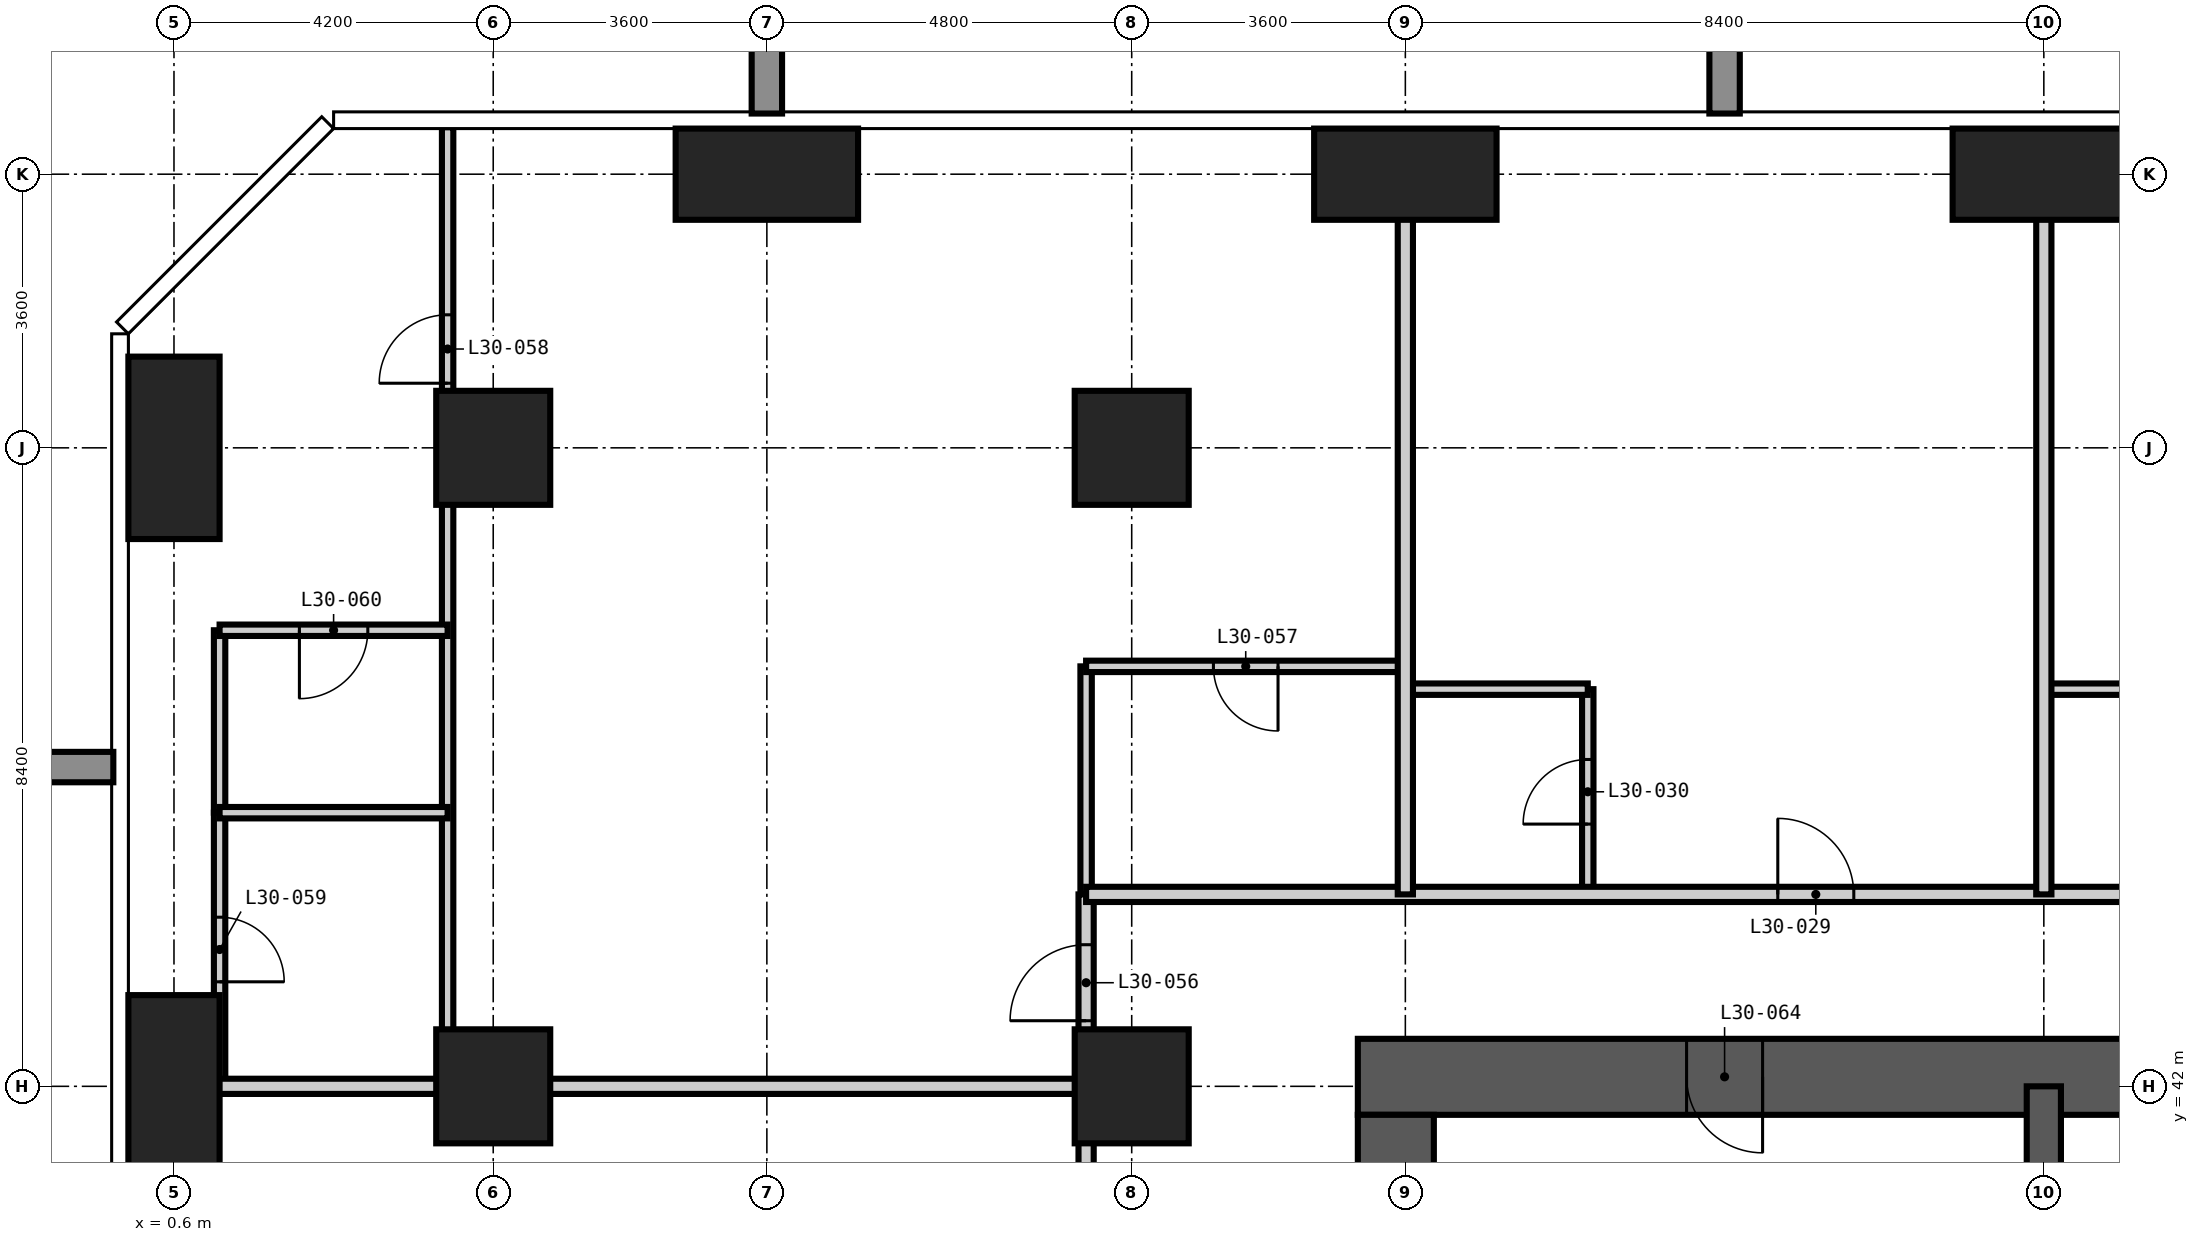
"""IFC4 building model, lengths in metres.
Left out: names, types, materials, properties, quantities, classifications, styles, units other than length and angle.
Written with IfcOpenShell. Run it as: python <this file> out.ifc"""

import sys

from ifc_helpers import new_model, si_unit, direction, frame, frame_2d, origin, origin_2d, place, context, subcontext, project, spatial, rectangle, extrude, element, fill, save


model = new_model("IFC4")
c1 = context("Model", 3, precision=1e-05, world=origin(), true_north=direction((0.0, 1.0)))
c2 = subcontext(c1, "Body", "Model", "MODEL_VIEW")
j1 = project(units=[si_unit("LENGTHUNIT", "METRE"), si_unit("PLANEANGLEUNIT", "RADIAN")], contexts=[c1])
p1 = place(None, origin())
s1 = spatial("IfcSite", under=j1, at=p1, CompositionType="ELEMENT")
p2 = place(p1, origin())
s2 = spatial("IfcBuilding", under=s1, at=p2, CompositionType="ELEMENT")
p3 = place(p2, frame((0.0, 0.0, 118.8)))
s3 = spatial("IfcBuildingStorey", under=s2, at=p3, CompositionType="ELEMENT", Elevation=118.8)
for number, where, z_axis, x_axis in (
    (1, (0.6, 42.0, -0.35), (0.0, 0.0, 1.0), (1.0, 0.0, 0.0)),
    (2, (0.6, 50.4, -0.35), (0.0, 0.0, 1.0), (1.0, 0.0, 0.0)),
):
    element("IfcColumn", number, at=place(p3, frame(where, z_axis=z_axis, x_axis=x_axis)), inside=s3, PredefinedType="COLUMN", context=c2, shape_type="SweptSolid", body=[
        extrude(rectangle(XDim=1.2, YDim=2.4, at=origin_2d()), origin(), (0.0, 0.0, 1.0), 3.6),
    ])
for number, where, z_axis, x_axis in (
    (3, (4.8, 42.0, -0.35), (0.0, 0.0, 1.0), (1.0, 0.0, 0.0)),
    (4, (4.8, 50.4, -0.35), (0.0, 0.0, 1.0), (1.0, 0.0, 0.0)),
):
    element("IfcColumn", number, at=place(p3, frame(where, z_axis=z_axis, x_axis=x_axis)), inside=s3, PredefinedType="COLUMN", context=c2, shape_type="SweptSolid", body=[
        extrude(rectangle(XDim=1.5, YDim=1.5, at=origin_2d()), origin(), (0.0, 0.0, 1.0), 3.6),
    ])
p4 = place(p3, frame((8.4, 54.0, -0.35), z_axis=(0.0, 0.0, 1.0), x_axis=(1.0, 0.0, 0.0)))
e5 = element("IfcColumn", 5, at=p4, inside=s3, PredefinedType="COLUMN", context=c2, shape_type="SweptSolid", body=[
    extrude(rectangle(XDim=2.4, YDim=1.2, at=origin_2d()), origin(), (0.0, 0.0, 1.0), 3.6),
])
for number, where, z_axis, x_axis in (
    (6, (13.2, 42.0, -0.35), (0.0, 0.0, 1.0), (1.0, 0.0, 0.0)),
    (7, (13.2, 50.4, -0.35), (0.0, 0.0, 1.0), (1.0, 0.0, 0.0)),
):
    element("IfcColumn", number, at=place(p3, frame(where, z_axis=z_axis, x_axis=x_axis)), inside=s3, PredefinedType="COLUMN", context=c2, shape_type="SweptSolid", body=[
        extrude(rectangle(XDim=1.5, YDim=1.5, at=origin_2d()), origin(), (0.0, 0.0, 1.0), 3.6),
    ])
for number, where, z_axis, x_axis in (
    (8, (16.8, 54.0, -0.35), (0.0, 0.0, 1.0), (1.0, 0.0, 0.0)),
    (9, (25.2, 54.0, -0.35), (0.0, 0.0, 1.0), (1.0, 0.0, 0.0)),
):
    element("IfcColumn", number, at=place(p3, frame(where, z_axis=z_axis, x_axis=x_axis)), inside=s3, PredefinedType="COLUMN", context=c2, shape_type="SweptSolid", body=[
        extrude(rectangle(XDim=2.4, YDim=1.2, at=origin_2d()), origin(), (0.0, 0.0, 1.0), 3.6),
    ])
p5 = place(p3, frame((42.625, 42.125, -0.35), z_axis=(0.0, 0.0, 1.0), x_axis=(-1.0, 0.0, 0.0)))
e10 = element("IfcWall", 10, at=p5, inside=s3, PredefinedType="SHEAR", context=c2, shape_type="SweptSolid", body=[
    extrude(rectangle(XDim=26.45, YDim=1.0, at=frame_2d((13.225, 0.0))), origin(), (0.0, 0.0, 1.0), 3.6),
])
p6 = place(p5, frame((21.125, 0.0, 0.35)))
e11 = element("IfcOpeningElement", 11, at=p6, cuts=e10, PredefinedType="OPENING", context=c2, shape_type="SweptSolid", body=[
    extrude(rectangle(XDim=1.0, YDim=2.1, at=frame_2d((0.5, 1.05))), frame((0.0, 0.51, 0.0), z_axis=(0.0, -1.0, 0.0), x_axis=(1.0, 0.0, 0.0)), (0.0, 0.0, 1.0), 1.02),
])
p7 = place(p5, frame((10.525, 0.0, 0.35)))
e12 = element("IfcOpeningElement", 12, at=p7, cuts=e10, PredefinedType="OPENING", context=c2, shape_type="SweptSolid", body=[
    extrude(rectangle(XDim=1.2, YDim=2.2, at=frame_2d((0.6, 1.1))), frame((0.0, 0.51, 0.0), z_axis=(0.0, -1.0, 0.0), x_axis=(1.0, 0.0, 0.0)), (0.0, 0.0, 1.0), 1.02),
])
p8 = place(p3, frame((16.675, 41.625, -0.35), z_axis=(0.0, 0.0, 1.0), x_axis=(0.0, -1.0, 0.0)))
e13 = element("IfcWall", 13, at=p8, inside=s3, PredefinedType="SHEAR", context=c2, shape_type="SweptSolid", body=[
    extrude(rectangle(XDim=24.45, YDim=1.0, at=frame_2d((12.225, 0.0))), origin(), (0.0, 0.0, 1.0), 3.6),
])
p9 = place(p8, frame((11.325, 0.0, 0.35)))
e14 = element("IfcOpeningElement", 14, at=p9, cuts=e13, PredefinedType="OPENING", context=c2, shape_type="SweptSolid", body=[
    extrude(rectangle(XDim=1.8, YDim=2.2, at=frame_2d((0.9, 1.1))), frame((0.0, 0.51, 0.0), z_axis=(0.0, -1.0, 0.0), x_axis=(1.0, 0.0, 0.0)), (0.0, 0.0, 1.0), 1.02),
])
p10 = place(p8, frame((20.125, 0.0, 0.35)))
e15 = element("IfcOpeningElement", 15, at=p10, cuts=e13, PredefinedType="OPENING", context=c2, shape_type="SweptSolid", body=[
    extrude(rectangle(XDim=1.0, YDim=2.1, at=frame_2d((0.5, 1.05))), frame((0.0, 0.51, 0.0), z_axis=(0.0, -1.0, 0.0), x_axis=(1.0, 0.0, 0.0)), (0.0, 0.0, 1.0), 1.02),
])
p11 = place(p8, frame((5.425, 0.0, 0.35)))
e16 = element("IfcOpeningElement", 16, at=p11, cuts=e13, PredefinedType="OPENING", context=c2, shape_type="SweptSolid", body=[
    extrude(rectangle(XDim=1.0, YDim=2.1, at=frame_2d((0.5, 1.05))), frame((0.0, 0.51, 0.0), z_axis=(0.0, -1.0, 0.0), x_axis=(1.0, 0.0, 0.0)), (0.0, 0.0, 1.0), 1.02),
])
p12 = place(p3, frame((25.2, 16.8, -0.35), z_axis=(0.0, 0.0, 1.0), x_axis=(0.0, 1.0, 0.0)))
e17 = element("IfcWall", 17, at=p12, inside=s3, PredefinedType="SHEAR", context=c2, shape_type="SweptSolid", body=[
    extrude(rectangle(XDim=25.2, YDim=0.45, at=frame_2d((12.6, 0.0))), origin(), (0.0, 0.0, 1.0), 3.6),
])
p13 = place(p12, frame((12.1, 0.0, 0.35)))
e18 = element("IfcOpeningElement", 18, at=p13, cuts=e17, PredefinedType="OPENING", context=c2, shape_type="SweptSolid", body=[
    extrude(rectangle(XDim=1.0, YDim=2.1, at=frame_2d((0.5, 1.05))), frame((0.0, 0.235, 0.0), z_axis=(0.0, -1.0, 0.0), x_axis=(1.0, 0.0, 0.0)), (0.0, 0.0, 1.0), 0.47),
])
p14 = place(p3, frame((1.2, 42.0, 0.0), z_axis=(0.0, 0.0, 1.0), x_axis=(0.0, 1.0, 0.0)))
e19 = element("IfcWall", 19, at=p14, inside=s3, PredefinedType="PARTITIONING", context=c2, shape_type="SweptSolid", body=[
    extrude(rectangle(XDim=3.6, YDim=0.15, at=frame_2d((1.8, 0.0))), origin(), (0.0, 0.0, 1.0), 3.25),
])
p15 = place(p14, frame((1.375, 0.0, 0.0)))
e20 = element("IfcOpeningElement", 20, at=p15, cuts=e19, PredefinedType="OPENING", context=c2, shape_type="SweptSolid", body=[
    extrude(rectangle(XDim=0.85, YDim=2.1, at=frame_2d((0.425, 1.05))), frame((0.0, 0.085, 0.0), z_axis=(0.0, -1.0, 0.0), x_axis=(1.0, 0.0, 0.0)), (0.0, 0.0, 1.0), 0.17),
])
p16 = place(p3, frame((12.6, 44.525, 0.0), z_axis=(0.0, 0.0, 1.0), x_axis=(0.0, 1.0, 0.0)))
e21 = element("IfcWall", 21, at=p16, inside=s3, PredefinedType="PARTITIONING", context=c2, shape_type="SweptSolid", body=[
    extrude(rectangle(XDim=3.0, YDim=0.15, at=frame_2d((1.5, 0.0))), origin(), (0.0, 0.0, 1.0), 3.25),
])
p17 = place(p3, frame((19.2, 44.525, 0.0), z_axis=(0.0, 0.0, 1.0), x_axis=(0.0, 1.0, 0.0)))
e22 = element("IfcWall", 22, at=p17, inside=s3, PredefinedType="PARTITIONING", context=c2, shape_type="SweptSolid", body=[
    extrude(rectangle(XDim=2.7, YDim=0.15, at=frame_2d((1.35, 0.0))), origin(), (0.0, 0.0, 1.0), 3.25),
])
p18 = place(p17, frame((0.925, 0.0, 0.0)))
e23 = element("IfcOpeningElement", 23, at=p18, cuts=e22, PredefinedType="OPENING", context=c2, shape_type="SweptSolid", body=[
    extrude(rectangle(XDim=0.85, YDim=2.1, at=frame_2d((0.425, 1.05))), frame((0.0, 0.085, 0.0), z_axis=(0.0, -1.0, 0.0), x_axis=(1.0, 0.0, 0.0)), (0.0, 0.0, 1.0), 0.17),
])
p19 = place(p3, frame((16.8, 47.225, 0.0), z_axis=(0.0, 0.0, 1.0), x_axis=(1.0, 0.0, 0.0)))
e24 = element("IfcWall", 24, at=p19, inside=s3, PredefinedType="PARTITIONING", context=c2, shape_type="SweptSolid", body=[
    extrude(rectangle(XDim=2.4, YDim=0.15, at=frame_2d((1.2, 0.0))), origin(), (0.0, 0.0, 1.0), 3.25),
])
p20 = place(p3, frame((25.2, 47.225, 0.0), z_axis=(0.0, 0.0, 1.0), x_axis=(1.0, 0.0, 0.0)))
e25 = element("IfcWall", 25, at=p20, inside=s3, PredefinedType="PARTITIONING", context=c2, shape_type="SweptSolid", body=[
    extrude(rectangle(XDim=2.4, YDim=0.15, at=frame_2d((1.2, 0.0))), origin(), (0.0, 0.0, 1.0), 3.25),
])
p21 = place(p3, frame((12.6, 47.525, 0.0), z_axis=(0.0, 0.0, 1.0), x_axis=(1.0, 0.0, 0.0)))
e26 = element("IfcWall", 26, at=p21, inside=s3, PredefinedType="PARTITIONING", context=c2, shape_type="SweptSolid", body=[
    extrude(rectangle(XDim=4.2, YDim=0.15, at=frame_2d((2.1, 0.0))), origin(), (0.0, 0.0, 1.0), 3.25),
])
p22 = place(p21, frame((1.675, 0.0, 0.0)))
e27 = element("IfcOpeningElement", 27, at=p22, cuts=e26, PredefinedType="OPENING", context=c2, shape_type="SweptSolid", body=[
    extrude(rectangle(XDim=0.85, YDim=2.1, at=frame_2d((0.425, 1.05))), frame((0.0, 0.085, 0.0), z_axis=(0.0, -1.0, 0.0), x_axis=(1.0, 0.0, 0.0)), (0.0, 0.0, 1.0), 0.17),
])
p23 = place(p3, frame((12.6, 13.075, 0.0), z_axis=(0.0, 0.0, 1.0), x_axis=(0.0, 1.0, 0.0)))
e28 = element("IfcWall", 28, at=p23, inside=s3, PredefinedType="PARTITIONING", context=c2, shape_type="SweptSolid", body=[
    extrude(rectangle(XDim=31.45, YDim=0.2, at=frame_2d((15.725, 0.0))), origin(), (0.0, 0.0, 1.0), 3.25),
])
p24 = place(p23, frame((8.625, 0.0, 0.0)))
e29 = element("IfcOpeningElement", 29, at=p24, cuts=e28, PredefinedType="OPENING", context=c2, shape_type="SweptSolid", body=[
    extrude(rectangle(XDim=1.0, YDim=2.2, at=frame_2d((0.5, 1.1))), frame((0.0, 0.11, 0.0), z_axis=(0.0, -1.0, 0.0), x_axis=(1.0, 0.0, 0.0)), (0.0, 0.0, 1.0), 0.22),
])
p25 = place(p23, frame((17.025, 0.0, 0.0)))
e30 = element("IfcOpeningElement", 30, at=p25, cuts=e28, PredefinedType="OPENING", context=c2, shape_type="SweptSolid", body=[
    extrude(rectangle(XDim=1.0, YDim=2.2, at=frame_2d((0.5, 1.1))), frame((0.0, 0.11, 0.0), z_axis=(0.0, -1.0, 0.0), x_axis=(1.0, 0.0, 0.0)), (0.0, 0.0, 1.0), 0.22),
])
p26 = place(p23, frame((25.425, 0.0, 0.0)))
e31 = element("IfcOpeningElement", 31, at=p26, cuts=e28, PredefinedType="OPENING", context=c2, shape_type="SweptSolid", body=[
    extrude(rectangle(XDim=1.0, YDim=2.2, at=frame_2d((0.5, 1.1))), frame((0.0, 0.11, 0.0), z_axis=(0.0, -1.0, 0.0), x_axis=(1.0, 0.0, 0.0)), (0.0, 0.0, 1.0), 0.22),
])
p27 = place(p23, frame((1.363, 0.0, 0.0)))
e32 = element("IfcOpeningElement", 32, at=p27, cuts=e28, PredefinedType="OPENING", context=c2, shape_type="SweptSolid", body=[
    extrude(rectangle(XDim=1.0, YDim=2.2, at=frame_2d((0.5, 1.1))), frame((0.0, 0.11, 0.0), z_axis=(0.0, -1.0, 0.0), x_axis=(1.0, 0.0, 0.0)), (0.0, 0.0, 1.0), 0.22),
])
p28 = place(p23, frame((29.788, 0.0, 0.0)))
e33 = element("IfcOpeningElement", 33, at=p28, cuts=e28, PredefinedType="OPENING", context=c2, shape_type="SweptSolid", body=[
    extrude(rectangle(XDim=1.0, YDim=2.2, at=frame_2d((0.5, 1.1))), frame((0.0, 0.11, 0.0), z_axis=(0.0, -1.0, 0.0), x_axis=(1.0, 0.0, 0.0)), (0.0, 0.0, 1.0), 0.22),
])
p29 = place(p3, frame((12.6, 44.525, 0.0), z_axis=(0.0, 0.0, 1.0), x_axis=(1.0, 0.0, 0.0)))
e34 = element("IfcWall", 34, at=p29, inside=s3, PredefinedType="PARTITIONING", context=c2, shape_type="SweptSolid", body=[
    extrude(rectangle(XDim=32.525, YDim=0.2, at=frame_2d((16.262, 0.0))), origin(), (0.0, 0.0, 1.0), 3.25),
])
p30 = place(p29, frame((9.1, 0.0, 0.0)))
e35 = element("IfcOpeningElement", 35, at=p30, cuts=e34, PredefinedType="OPENING", context=c2, shape_type="SweptSolid", body=[
    extrude(rectangle(XDim=1.0, YDim=2.2, at=frame_2d((0.5, 1.1))), frame((0.0, 0.11, 0.0), z_axis=(0.0, -1.0, 0.0), x_axis=(1.0, 0.0, 0.0)), (0.0, 0.0, 1.0), 0.22),
])
p31 = place(p29, frame((17.5, 0.0, 0.0)))
e36 = element("IfcOpeningElement", 36, at=p31, cuts=e34, PredefinedType="OPENING", context=c2, shape_type="SweptSolid", body=[
    extrude(rectangle(XDim=1.0, YDim=2.2, at=frame_2d((0.5, 1.1))), frame((0.0, 0.11, 0.0), z_axis=(0.0, -1.0, 0.0), x_axis=(1.0, 0.0, 0.0)), (0.0, 0.0, 1.0), 0.22),
])
p32 = place(p29, frame((25.9, 0.0, 0.0)))
e37 = element("IfcOpeningElement", 37, at=p32, cuts=e34, PredefinedType="OPENING", context=c2, shape_type="SweptSolid", body=[
    extrude(rectangle(XDim=1.0, YDim=2.2, at=frame_2d((0.5, 1.1))), frame((0.0, 0.11, 0.0), z_axis=(0.0, -1.0, 0.0), x_axis=(1.0, 0.0, 0.0)), (0.0, 0.0, 1.0), 0.22),
])
for number, where, z_axis, x_axis in (
    (38, (16.8, 44.525, 0.0), (0.0, 0.0, 1.0), (0.0, 1.0, 0.0)),
    (39, (25.2, 44.525, 0.0), (0.0, 0.0, 1.0), (0.0, 1.0, 0.0)),
):
    element("IfcWall", number, at=place(p3, frame(where, z_axis=z_axis, x_axis=x_axis)), inside=s3, PredefinedType="PARTITIONING", context=c2, shape_type="SweptSolid", body=[
        extrude(rectangle(XDim=10.093, YDim=0.2, at=frame_2d((5.046, 0.0))), origin(), (0.0, 0.0, 1.0), 3.25),
    ])
p33 = place(p3, frame((-0.018, 42.0, 0.0), z_axis=(0.0, 0.0, 1.0), x_axis=(1.0, 0.0, 0.0)))
e40 = element("IfcWall", 40, at=p33, inside=s3, PredefinedType="PARTITIONING", context=c2, shape_type="SweptSolid", body=[
    extrude(rectangle(XDim=12.618, YDim=0.2, at=frame_2d((6.309, 0.0))), origin(), (0.0, 0.0, 1.0), 3.25),
])
p34 = place(p3, frame((1.2, 45.6, 0.0), z_axis=(0.0, 0.0, 1.0), x_axis=(0.0, 1.0, 0.0)))
e41 = element("IfcWall", 41, at=p34, inside=s3, PredefinedType="PARTITIONING", context=c2, shape_type="SweptSolid", body=[
    extrude(rectangle(XDim=2.4, YDim=0.15, at=frame_2d((1.2, 0.0))), origin(), (0.0, 0.0, 1.0), 3.25),
])
p35 = place(p3, frame((4.2, 42.0, 0.0), z_axis=(0.0, 0.0, 1.0), x_axis=(0.0, 1.0, 0.0)))
e42 = element("IfcWall", 42, at=p35, inside=s3, PredefinedType="PARTITIONING", context=c2, shape_type="SweptSolid", body=[
    extrude(rectangle(XDim=12.618, YDim=0.15, at=frame_2d((6.309, 0.0))), origin(), (0.0, 0.0, 1.0), 3.25),
])
p36 = place(p35, frame((9.25, 0.0, 0.0)))
e43 = element("IfcOpeningElement", 43, at=p36, cuts=e42, PredefinedType="OPENING", context=c2, shape_type="SweptSolid", body=[
    extrude(rectangle(XDim=0.9, YDim=2.1, at=frame_2d((0.45, 1.05))), frame((0.0, 0.085, 0.0), z_axis=(0.0, -1.0, 0.0), x_axis=(1.0, 0.0, 0.0)), (0.0, 0.0, 1.0), 0.17),
])
p37 = place(p3, frame((1.2, 45.6, 0.0), z_axis=(0.0, 0.0, 1.0), x_axis=(1.0, 0.0, 0.0)))
e44 = element("IfcWall", 44, at=p37, inside=s3, PredefinedType="PARTITIONING", context=c2, shape_type="SweptSolid", body=[
    extrude(rectangle(XDim=3.0, YDim=0.15, at=frame_2d((1.5, 0.0))), origin(), (0.0, 0.0, 1.0), 3.25),
])
p38 = place(p3, frame((1.2, 48.0, 0.0), z_axis=(0.0, 0.0, 1.0), x_axis=(1.0, 0.0, 0.0)))
e45 = element("IfcWall", 45, at=p38, inside=s3, PredefinedType="PARTITIONING", context=c2, shape_type="SweptSolid", body=[
    extrude(rectangle(XDim=3.0, YDim=0.15, at=frame_2d((1.5, 0.0))), origin(), (0.0, 0.0, 1.0), 3.25),
])
p39 = place(p38, frame((1.05, 0.0, 0.0)))
e46 = element("IfcOpeningElement", 46, at=p39, cuts=e45, PredefinedType="OPENING", context=c2, shape_type="SweptSolid", body=[
    extrude(rectangle(XDim=0.9, YDim=2.1, at=frame_2d((0.45, 1.05))), frame((0.0, 0.085, 0.0), z_axis=(0.0, -1.0, 0.0), x_axis=(1.0, 0.0, 0.0)), (0.0, 0.0, 1.0), 0.17),
])
p40 = place(p30, origin())
e47 = element("IfcDoor", 47, at=p40, inside=s3, OperationType="SINGLE_SWING_LEFT", PredefinedType="DOOR", context=c2, shape_type="SweptSolid", body=[
    extrude(rectangle(XDim=1.0, YDim=2.2, at=frame_2d((0.5, 1.1))), frame((0.0, 0.025, 0.0), z_axis=(0.0, -1.0, 0.0), x_axis=(1.0, 0.0, 0.0)), (0.0, 0.0, 1.0), 0.05),
])
fill(e35, e47)
p41 = place(p18, origin())
e48 = element("IfcDoor", 48, at=p41, inside=s3, OperationType="SINGLE_SWING_LEFT", PredefinedType="DOOR", context=c2, shape_type="SweptSolid", body=[
    extrude(rectangle(XDim=0.85, YDim=2.1, at=frame_2d((0.425, 1.05))), frame((0.0, 0.025, 0.0), z_axis=(0.0, -1.0, 0.0), x_axis=(1.0, 0.0, 0.0)), (0.0, 0.0, 1.0), 0.05),
])
fill(e23, e48)
p42 = place(p28, origin())
e49 = element("IfcDoor", 49, at=p42, inside=s3, OperationType="SINGLE_SWING_LEFT", PredefinedType="DOOR", context=c2, shape_type="SweptSolid", body=[
    extrude(rectangle(XDim=1.0, YDim=2.2, at=frame_2d((0.5, 1.1))), frame((0.0, 0.025, 0.0), z_axis=(0.0, -1.0, 0.0), x_axis=(1.0, 0.0, 0.0)), (0.0, 0.0, 1.0), 0.05),
])
fill(e33, e49)
p43 = place(p22, frame((0.85, 0.0, 0.0), z_axis=(0.0, 0.0, 1.0), x_axis=(-1.0, 0.0, 0.0)))
e50 = element("IfcDoor", 50, at=p43, inside=s3, OperationType="SINGLE_SWING_LEFT", PredefinedType="DOOR", context=c2, shape_type="SweptSolid", body=[
    extrude(rectangle(XDim=0.85, YDim=2.1, at=frame_2d((0.425, 1.05))), frame((0.0, 0.025, 0.0), z_axis=(0.0, -1.0, 0.0), x_axis=(1.0, 0.0, 0.0)), (0.0, 0.0, 1.0), 0.05),
])
fill(e27, e50)
p44 = place(p36, origin())
e51 = element("IfcDoor", 51, at=p44, inside=s3, OperationType="SINGLE_SWING_LEFT", PredefinedType="DOOR", context=c2, shape_type="SweptSolid", body=[
    extrude(rectangle(XDim=0.9, YDim=2.1, at=frame_2d((0.45, 1.05))), frame((0.0, 0.025, 0.0), z_axis=(0.0, -1.0, 0.0), x_axis=(1.0, 0.0, 0.0)), (0.0, 0.0, 1.0), 0.05),
])
fill(e43, e51)
p45 = place(p15, frame((0.85, 0.0, 0.0), z_axis=(0.0, 0.0, 1.0), x_axis=(-1.0, 0.0, 0.0)))
e52 = element("IfcDoor", 52, at=p45, inside=s3, OperationType="SINGLE_SWING_RIGHT", PredefinedType="DOOR", context=c2, shape_type="SweptSolid", body=[
    extrude(rectangle(XDim=0.85, YDim=2.1, at=frame_2d((0.425, 1.05))), frame((0.0, 0.025, 0.0), z_axis=(0.0, -1.0, 0.0), x_axis=(1.0, 0.0, 0.0)), (0.0, 0.0, 1.0), 0.05),
])
fill(e20, e52)
p46 = place(p39, frame((0.9, 0.0, 0.0), z_axis=(0.0, 0.0, 1.0), x_axis=(-1.0, 0.0, 0.0)))
e53 = element("IfcDoor", 53, at=p46, inside=s3, OperationType="SINGLE_SWING_RIGHT", PredefinedType="DOOR", context=c2, shape_type="SweptSolid", body=[
    extrude(rectangle(XDim=0.9, YDim=2.1, at=frame_2d((0.45, 1.05))), frame((0.0, 0.025, 0.0), z_axis=(0.0, -1.0, 0.0), x_axis=(1.0, 0.0, 0.0)), (0.0, 0.0, 1.0), 0.05),
])
fill(e46, e53)
p47 = place(p6, origin())
e54 = element("IfcDoor", 54, at=p47, inside=s3, OperationType="SINGLE_SWING_LEFT", PredefinedType="DOOR", context=c2, shape_type="SweptSolid", body=[
    extrude(rectangle(XDim=1.0, YDim=2.1, at=frame_2d((0.5, 1.05))), frame((0.0, 0.025, 0.0), z_axis=(0.0, -1.0, 0.0), x_axis=(1.0, 0.0, 0.0)), (0.0, 0.0, 1.0), 0.05),
])
fill(e11, e54)
save(model, sys.argv[1])
